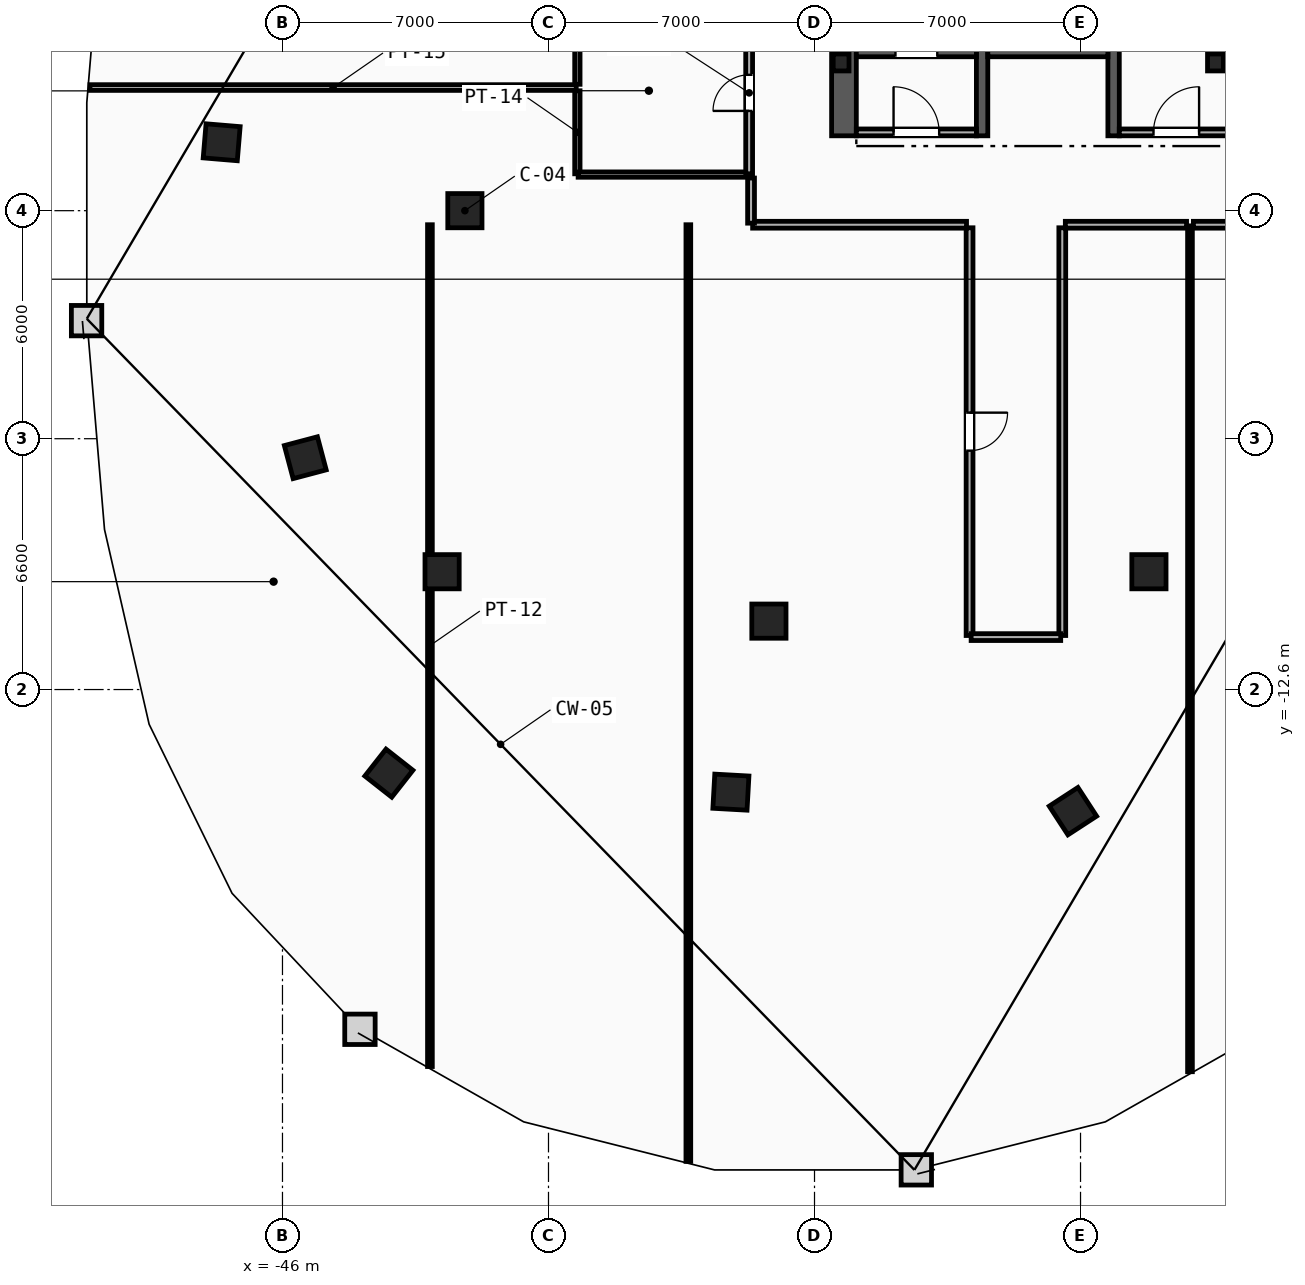
"""IFC4 building model, lengths in metres.
Left out: names, types, materials, properties, quantities, classifications, styles, units other than length and angle.
Written with IfcOpenShell. Run it as: python <this file> out.ifc"""

import sys

from ifc_helpers import new_model, si_unit, direction, frame, frame_2d, origin, origin_2d, place, context, subcontext, project, spatial, rectangle, i_section, extrude, element, fill, save


model = new_model("IFC4")
c1 = context("Model", 3, precision=1e-05, world=origin(), true_north=direction((0.0, 1.0)))
c2 = subcontext(c1, "Body", "Model", "MODEL_VIEW")
j1 = project(units=[si_unit("LENGTHUNIT", "METRE"), si_unit("PLANEANGLEUNIT", "RADIAN")], contexts=[c1])
p1 = place(None, origin())
s1 = spatial("IfcSite", under=j1, at=p1, CompositionType="ELEMENT")
p2 = place(p1, origin())
s2 = spatial("IfcBuilding", under=s1, at=p2, CompositionType="ELEMENT")
p3 = place(p2, frame((0.0, 0.0, 191.8)))
s3 = spatial("IfcBuildingStorey", under=s2, at=p3, CompositionType="ELEMENT", Elevation=191.8)
for number, where, z_axis, x_axis in (
    (1, (-31.3, 3.9, 0.0), (0.0, 0.0, 1.0), (1.0, 0.0, 0.0)),
    (2, (-21.45, 3.9, 0.0), (0.0, 0.0, 1.0), (1.0, 0.0, 0.0)),
):
    element("IfcColumn", number, at=place(p3, frame(where, z_axis=z_axis, x_axis=x_axis)), inside=s3, PredefinedType="COLUMN", context=c2, shape_type="SweptSolid", body=[
        extrude(i_section(OverallWidth=0.416, OverallDepth=0.446, WebThickness=0.039, FlangeThickness=0.063, FilletRadius=0.018, at=origin_2d()), origin(), (0.0, 0.0, 1.0), 3.6),
    ])
for number, where, z_axis, x_axis in (
    (3, (-41.2, 0.0, 0.0), (0.0, 0.0, 1.0), (1.0, 0.0, 0.0)),
    (4, (-41.8, -9.5, 0.0), (0.0, 0.0, 1.0), (1.0, 0.0, 0.0)),
    (5, (-33.2, -10.8, 0.0), (0.0, 0.0, 1.0), (1.0, 0.0, 0.0)),
    (6, (-23.2, -9.5, 0.0), (0.0, 0.0, 1.0), (1.0, 0.0, 0.0)),
    (7, (-47.6, 1.8, 0.0), (0.0, 0.0, 1.0), (-0.084, -0.997, 0.0)),
    (8, (-45.4, -6.5, 0.0), (0.0, 0.0, 1.0), (0.256, -0.967, 0.0)),
    (9, (-43.2, -14.8, 0.0), (0.0, 0.0, 1.0), (0.786, -0.618, 0.0)),
    (10, (-34.2, -15.3, 0.0), (0.0, 0.0, 1.0), (0.998, -0.055, 0.0)),
    (11, (-25.2, -15.8, 0.0), (0.0, 0.0, 1.0), (0.838, 0.546, 0.0)),
):
    element("IfcColumn", number, at=place(p3, frame(where, z_axis=z_axis, x_axis=x_axis)), inside=s3, PredefinedType="COLUMN", context=c2, shape_type="SweptSolid", body=[
        extrude(rectangle(XDim=0.9, YDim=0.9, at=origin_2d()), origin(), (0.0, 0.0, 1.0), 3.6),
    ])
p4 = place(p3, frame((-31.225, 1.97, 0.0), z_axis=(0.0, 0.0, 1.0), x_axis=(0.0, 1.0, 0.0)))
e12 = element("IfcWall", 12, at=p4, inside=s3, PredefinedType="SHEAR", context=c2, shape_type="SweptSolid", body=[
    extrude(rectangle(XDim=13.33, YDim=0.65, at=frame_2d((6.665, 0.0))), origin(), (0.0, 0.0, 1.0), 3.34),
])
for number, where, z_axis, x_axis in (
    (13, (-27.59, 1.97, 0.0), (0.0, 0.0, 1.0), (0.0, 1.0, 0.0)),
    (14, (-24.13, 1.97, 0.0), (0.0, 0.0, 1.0), (0.0, 1.0, 0.0)),
):
    element("IfcWall", number, at=place(p3, frame(where, z_axis=z_axis, x_axis=x_axis)), inside=s3, PredefinedType="SHEAR", context=c2, shape_type="SweptSolid", body=[
        extrude(rectangle(XDim=10.68, YDim=0.3, at=frame_2d((5.34, 0.0))), origin(), (0.0, 0.0, 1.0), 3.34),
    ])
p5 = place(p3, frame((-30.9, 4.2, 0.0), z_axis=(0.0, 0.0, 1.0), x_axis=(1.0, 0.0, 0.0)))
e15 = element("IfcWall", 15, at=p5, inside=s3, PredefinedType="SHEAR", context=c2, shape_type="SweptSolid", body=[
    extrude(rectangle(XDim=3.16, YDim=0.3, at=frame_2d((1.58, 0.0))), origin(), (0.0, 0.0, 1.0), 3.34),
])
p6 = place(p5, frame((1.03, 0.0, 0.0)))
e16 = element("IfcOpeningElement", 16, at=p6, cuts=e15, PredefinedType="OPENING", context=c2, shape_type="SweptSolid", body=[
    extrude(rectangle(XDim=1.1, YDim=2.15, at=frame_2d((0.55, 1.075))), frame((0.0, 0.16, 0.0), z_axis=(0.0, -1.0, 0.0), x_axis=(1.0, 0.0, 0.0)), (0.0, 0.0, 1.0), 0.32),
])
p7 = place(p3, frame((-27.44, 4.2, 0.0), z_axis=(0.0, 0.0, 1.0), x_axis=(1.0, 0.0, 0.0)))
e17 = element("IfcWall", 17, at=p7, inside=s3, PredefinedType="SHEAR", context=c2, shape_type="SweptSolid", body=[
    extrude(rectangle(XDim=3.16, YDim=0.3, at=frame_2d((1.58, 0.0))), origin(), (0.0, 0.0, 1.0), 3.34),
])
p8 = place(p3, frame((-23.98, 2.06, 0.0), z_axis=(0.0, 0.0, 1.0), x_axis=(1.0, 0.0, 0.0)))
e18 = element("IfcWall", 18, at=p8, inside=s3, PredefinedType="PARTITIONING", context=c2, shape_type="SweptSolid", body=[
    extrude(rectangle(XDim=3.0, YDim=0.18, at=frame_2d((1.5, 0.0))), origin(), (0.0, 0.0, 1.0), 3.34),
])
p9 = place(p8, frame((0.9, 0.0, 0.0)))
e19 = element("IfcOpeningElement", 19, at=p9, cuts=e18, PredefinedType="OPENING", context=c2, shape_type="SweptSolid", body=[
    extrude(rectangle(XDim=1.2, YDim=2.15, at=frame_2d((0.6, 1.075))), frame((0.0, 0.1, 0.0), z_axis=(0.0, -1.0, 0.0), x_axis=(1.0, 0.0, 0.0)), (0.0, 0.0, 1.0), 0.2),
])
p10 = place(p3, frame((-30.9, 2.06, 0.0), z_axis=(0.0, 0.0, 1.0), x_axis=(1.0, 0.0, 0.0)))
e20 = element("IfcWall", 20, at=p10, inside=s3, PredefinedType="PARTITIONING", context=c2, shape_type="SweptSolid", body=[
    extrude(rectangle(XDim=3.16, YDim=0.18, at=frame_2d((1.58, 0.0))), origin(), (0.0, 0.0, 1.0), 3.34),
])
p11 = place(p10, frame((0.98, 0.0, 0.0)))
e21 = element("IfcOpeningElement", 21, at=p11, cuts=e20, PredefinedType="OPENING", context=c2, shape_type="SweptSolid", body=[
    extrude(rectangle(XDim=1.2, YDim=2.15, at=frame_2d((0.6, 1.075))), frame((0.0, 0.1, 0.0), z_axis=(0.0, -1.0, 0.0), x_axis=(1.0, 0.0, 0.0)), (0.0, 0.0, 1.0), 0.2),
])
p12 = place(p3, frame((-38.24, 0.97, 0.0), z_axis=(0.0, 0.0, 1.0), x_axis=(0.0, 1.0, 0.0)))
e22 = element("IfcWall", 22, at=p12, inside=s3, PredefinedType="PARTITIONING", context=c2, shape_type="SweptSolid", body=[
    extrude(rectangle(XDim=2.185, YDim=0.14, at=frame_2d((1.093, 0.0))), origin(), (0.0, 0.0, 1.0), 3.34),
])
p13 = place(p3, frame((-38.24, 3.325, 0.0), z_axis=(0.0, 0.0, 1.0), x_axis=(0.0, 1.0, 0.0)))
e23 = element("IfcWall", 23, at=p13, inside=s3, PredefinedType="PARTITIONING", context=c2, shape_type="SweptSolid", body=[
    extrude(rectangle(XDim=1.92, YDim=0.14, at=frame_2d((0.96, 0.0))), origin(), (0.0, 0.0, 1.0), 3.34),
])
p14 = place(p3, frame((-38.22, 0.95, 0.0), z_axis=(0.0, 0.0, 1.0), x_axis=(1.0, 0.0, 0.0)))
e24 = element("IfcWall", 24, at=p14, inside=s3, PredefinedType="PARTITIONING", context=c2, shape_type="SweptSolid", body=[
    extrude(rectangle(XDim=4.48, YDim=0.14, at=frame_2d((2.24, 0.0))), origin(), (0.0, 0.0, 1.0), 3.34),
])
p15 = place(p3, frame((-33.72, 0.97, 0.0), z_axis=(0.0, 0.0, 1.0), x_axis=(0.0, 1.0, 0.0)))
e25 = element("IfcWall", 25, at=p15, inside=s3, PredefinedType="PARTITIONING", context=c2, shape_type="SweptSolid", body=[
    extrude(rectangle(XDim=4.26, YDim=0.18, at=frame_2d((2.13, 0.0))), origin(), (0.0, 0.0, 1.0), 3.34),
])
p16 = place(p15, frame((1.655, 0.0, 0.0)))
e26 = element("IfcOpeningElement", 26, at=p16, cuts=e25, PredefinedType="OPENING", context=c2, shape_type="SweptSolid", body=[
    extrude(rectangle(XDim=0.95, YDim=2.1, at=frame_2d((0.475, 1.05))), frame((0.0, 0.1, 0.0), z_axis=(0.0, -1.0, 0.0), x_axis=(1.0, 0.0, 0.0)), (0.0, 0.0, 1.0), 0.2),
])
p17 = place(p3, frame((-42.12, -22.52, 0.0), z_axis=(0.0, 0.0, 1.0), x_axis=(0.0, 1.0, 0.0)))
e27 = element("IfcWall", 27, at=p17, inside=s3, PredefinedType="PARTITIONING", context=c2, shape_type="SweptSolid", body=[
    extrude(rectangle(XDim=22.149, YDim=0.125, at=frame_2d((11.075, 0.0))), origin(), (0.0, 0.0, 1.0), 3.34),
])
p18 = place(p3, frame((-35.32, -25.015, 0.0), z_axis=(0.0, 0.0, 1.0), x_axis=(0.0, 1.0, 0.0)))
e28 = element("IfcWall", 28, at=p18, inside=s3, PredefinedType="PARTITIONING", context=c2, shape_type="SweptSolid", body=[
    extrude(rectangle(XDim=24.645, YDim=0.125, at=frame_2d((12.323, 0.0))), origin(), (0.0, 0.0, 1.0), 3.34),
])
p19 = place(p3, frame((-22.12, -22.656, 0.0), z_axis=(0.0, 0.0, 1.0), x_axis=(0.0, 1.0, 0.0)))
e29 = element("IfcWall", 29, at=p19, inside=s3, PredefinedType="PARTITIONING", context=c2, shape_type="SweptSolid", body=[
    extrude(rectangle(XDim=22.256, YDim=0.125, at=frame_2d((11.128, 0.0))), origin(), (0.0, 0.0, 1.0), 2.724),
])
p20 = place(p3, frame((-51.066, 3.24, 0.0), z_axis=(0.0, 0.0, 1.0), x_axis=(1.0, 0.0, 0.0)))
e30 = element("IfcWall", 30, at=p20, inside=s3, PredefinedType="PARTITIONING", context=c2, shape_type="SweptSolid", body=[
    extrude(rectangle(XDim=12.796, YDim=0.15, at=frame_2d((6.398, 0.0))), origin(), (0.0, 0.0, 1.0), 3.34),
])
p21 = place(p3, frame((-27.92, -0.45, 0.0), z_axis=(0.0, 0.0, 1.0), x_axis=(0.0, -1.0, 0.0)))
e31 = element("IfcWall", 31, at=p21, inside=s3, PredefinedType="PARTITIONING", context=c2, shape_type="SweptSolid", body=[
    extrude(rectangle(XDim=10.729, YDim=0.18, at=frame_2d((5.364, 0.0))), origin(), (0.0, 0.0, 1.0), 3.34),
])
p22 = place(p21, frame((4.864, 0.0, 0.0)))
e32 = element("IfcOpeningElement", 32, at=p22, cuts=e31, PredefinedType="OPENING", context=c2, shape_type="SweptSolid", body=[
    extrude(rectangle(XDim=1.0, YDim=2.15, at=frame_2d((0.5, 1.075))), frame((0.0, 0.1, 0.0), z_axis=(0.0, -1.0, 0.0), x_axis=(1.0, 0.0, 0.0)), (0.0, 0.0, 1.0), 0.2),
])
p23 = place(p3, frame((-25.48, -11.178, 0.0), z_axis=(0.0, 0.0, 1.0), x_axis=(0.0, 1.0, 0.0)))
e33 = element("IfcWall", 33, at=p23, inside=s3, PredefinedType="PARTITIONING", context=c2, shape_type="SweptSolid", body=[
    extrude(rectangle(XDim=10.729, YDim=0.18, at=frame_2d((5.364, 0.0))), origin(), (0.0, 0.0, 1.0), 3.34),
])
p24 = place(p3, frame((-33.628, -0.37, 0.0), z_axis=(0.0, 0.0, 1.0), x_axis=(1.0, 0.0, 0.0)))
e34 = element("IfcWall", 34, at=p24, inside=s3, PredefinedType="PARTITIONING", context=c2, shape_type="SweptSolid", body=[
    extrude(rectangle(XDim=5.628, YDim=0.18, at=frame_2d((2.814, 0.0))), origin(), (0.0, 0.0, 1.0), 3.34),
])
p25 = place(p3, frame((-25.4, -0.37, 0.0), z_axis=(0.0, 0.0, 1.0), x_axis=(1.0, 0.0, 0.0)))
e35 = element("IfcWall", 35, at=p25, inside=s3, PredefinedType="PARTITIONING", context=c2, shape_type="SweptSolid", body=[
    extrude(rectangle(XDim=3.19, YDim=0.18, at=frame_2d((1.595, 0.0))), origin(), (0.0, 0.0, 1.0), 3.34),
])
p26 = place(p3, frame((-27.878, -11.22, 0.0), z_axis=(0.0, 0.0, 1.0), x_axis=(1.0, 0.0, 0.0)))
e36 = element("IfcWall", 36, at=p26, inside=s3, PredefinedType="PARTITIONING", context=c2, shape_type="SweptSolid", body=[
    extrude(rectangle(XDim=2.357, YDim=0.18, at=frame_2d((1.178, 0.0))), origin(), (0.0, 0.0, 1.0), 3.34),
])
p27 = place(p3, frame((-33.67, 0.859, 0.0), z_axis=(0.0, 0.0, 1.0), x_axis=(0.0, -1.0, 0.0)))
e37 = element("IfcWall", 37, at=p27, inside=s3, PredefinedType="PARTITIONING", context=c2, shape_type="SweptSolid", body=[
    extrude(rectangle(XDim=1.187, YDim=0.18, at=frame_2d((0.594, 0.0))), origin(), (0.0, 0.0, 1.0), 3.34),
])
p28 = place(p3, frame((-22.03, -0.37, 0.0), z_axis=(0.0, 0.0, 1.0), x_axis=(1.0, 0.0, 0.0)))
e38 = element("IfcWall", 38, at=p28, inside=s3, PredefinedType="PARTITIONING", context=c2, shape_type="SweptSolid", body=[
    extrude(rectangle(XDim=5.208, YDim=0.18, at=frame_2d((2.604, 0.0))), origin(), (0.0, 0.0, 1.0), 3.34),
])
p29 = place(p9, origin())
e39 = element("IfcDoor", 39, at=p29, inside=s3, OperationType="SINGLE_SWING_RIGHT", PredefinedType="DOOR", context=c2, shape_type="SweptSolid", body=[
    extrude(rectangle(XDim=1.2, YDim=2.15, at=frame_2d((0.6, 1.075))), frame((0.0, 0.025, 0.0), z_axis=(0.0, -1.0, 0.0), x_axis=(1.0, 0.0, 0.0)), (0.0, 0.0, 1.0), 0.05),
])
fill(e19, e39)
p30 = place(p11, origin())
e40 = element("IfcDoor", 40, at=p30, inside=s3, OperationType="SINGLE_SWING_LEFT", PredefinedType="DOOR", context=c2, shape_type="SweptSolid", body=[
    extrude(rectangle(XDim=1.2, YDim=2.15, at=frame_2d((0.6, 1.075))), frame((0.0, 0.025, 0.0), z_axis=(0.0, -1.0, 0.0), x_axis=(1.0, 0.0, 0.0)), (0.0, 0.0, 1.0), 0.05),
])
fill(e21, e40)
p31 = place(p22, origin())
e41 = element("IfcDoor", 41, at=p31, inside=s3, OperationType="SINGLE_SWING_LEFT", PredefinedType="DOOR", context=c2, shape_type="SweptSolid", body=[
    extrude(rectangle(XDim=1.0, YDim=2.15, at=frame_2d((0.5, 1.075))), frame((0.0, 0.025, 0.0), z_axis=(0.0, -1.0, 0.0), x_axis=(1.0, 0.0, 0.0)), (0.0, 0.0, 1.0), 0.05),
])
fill(e32, e41)
p32 = place(p16, origin())
e42 = element("IfcDoor", 42, at=p32, inside=s3, OperationType="SINGLE_SWING_LEFT", PredefinedType="DOOR", context=c2, shape_type="SweptSolid", body=[
    extrude(rectangle(XDim=0.95, YDim=2.1, at=frame_2d((0.475, 1.05))), frame((0.0, 0.025, 0.0), z_axis=(0.0, -1.0, 0.0), x_axis=(1.0, 0.0, 0.0)), (0.0, 0.0, 1.0), 0.05),
])
fill(e26, e42)
save(model, sys.argv[1])
